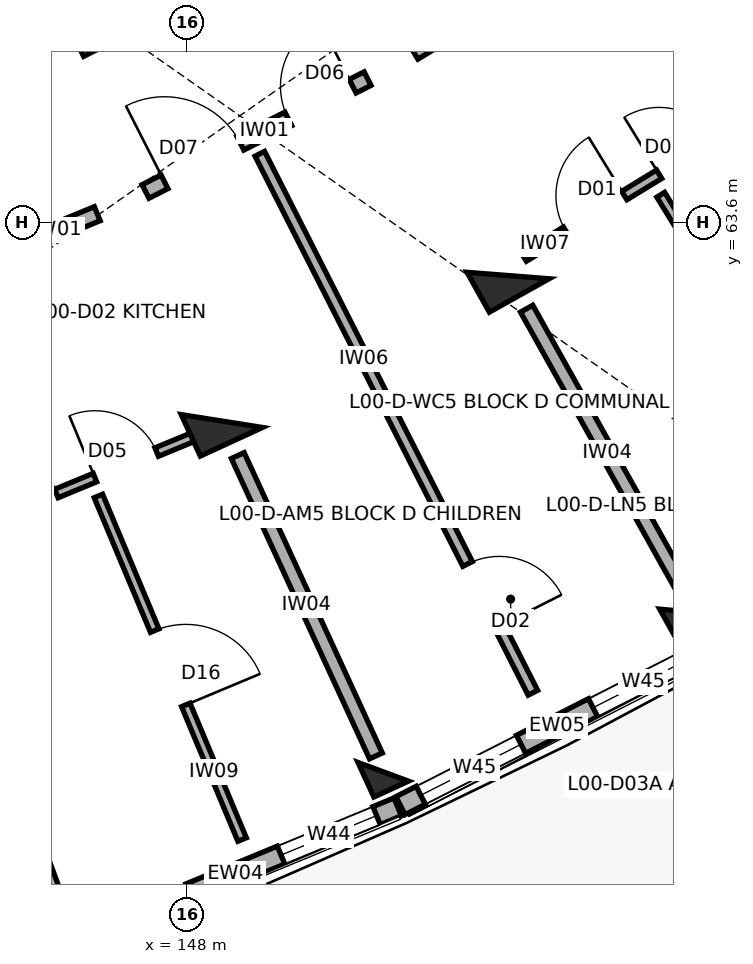
"""IFC4 building model, lengths in metres.
Left out: names, types, materials, properties, quantities, classifications, styles, units other than length and angle.
Written with IfcOpenShell. Run it as: python <this file> out.ifc"""

import sys

from ifc_helpers import new_model, si_unit, direction, frame, frame_2d, origin, origin_2d, place, context, subcontext, project, spatial, rectangle, extrude, element, fill, save


model = new_model("IFC4")
c1 = context("Model", 3, precision=1e-05, world=origin(), true_north=direction((0.0, 1.0)))
c2 = subcontext(c1, "Body", "Model", "MODEL_VIEW")
j1 = project(units=[si_unit("LENGTHUNIT", "METRE"), si_unit("PLANEANGLEUNIT", "RADIAN")], contexts=[c1])
p1 = place(None, origin())
s1 = spatial("IfcSite", under=j1, at=p1, CompositionType="ELEMENT")
p2 = place(p1, origin())
s2 = spatial("IfcBuilding", under=s1, at=p2, CompositionType="ELEMENT")
p3 = place(p2, origin())
s3 = spatial("IfcBuildingStorey", under=s2, at=p3, CompositionType="ELEMENT", Elevation=0.0)
p4 = place(p3, frame((146.311, 54.602, 0.0), z_axis=(0.0, 0.0, 1.0), x_axis=(0.345298198999, -0.93849302276, 0.0)))
e1 = element("IfcColumn", 1, at=p4, inside=s3, PredefinedType="COLUMN", context=c2, shape_type="SweptSolid", body=[
    extrude(rectangle(XDim=0.55, YDim=0.8, at=origin_2d()), origin(), (0.0, 0.0, 1.0), 4.5),
])
p5 = place(p3, frame((148.461, 60.982, 0.0), z_axis=(0.0, 0.0, 1.0), x_axis=(0.417867073801, -0.908508177527, 0.0)))
e2 = element("IfcColumn", 2, at=p5, inside=s3, PredefinedType="COLUMN", context=c2, shape_type="SweptSolid", body=[
    extrude(rectangle(XDim=0.6, YDim=0.9, at=origin_2d()), origin(), (0.0, 0.0, 1.0), 4.5),
])
p6 = place(p3, frame((150.584, 56.367, 0.0), z_axis=(0.0, 0.0, 1.0), x_axis=(0.417867073801, -0.908508177527, 0.0)))
e3 = element("IfcColumn", 3, at=p6, inside=s3, PredefinedType="COLUMN", context=c2, shape_type="SweptSolid", body=[
    extrude(rectangle(XDim=0.5, YDim=0.5, at=origin_2d()), origin(), (0.0, 0.0, 1.0), 4.5),
])
p7 = place(p3, frame((152.227, 62.897, 0.0), z_axis=(0.0, 0.0, 1.0), x_axis=(0.487859659139, -0.87292207727, 0.0)))
e4 = element("IfcColumn", 4, at=p7, inside=s3, PredefinedType="COLUMN", context=c2, shape_type="SweptSolid", body=[
    extrude(rectangle(XDim=0.6, YDim=0.9, at=origin_2d()), origin(), (0.0, 0.0, 1.0), 4.5),
])
p8 = place(p3, frame((154.705, 58.462, 0.0), z_axis=(0.0, 0.0, 1.0), x_axis=(0.487859659139, -0.87292207727, 0.0)))
e5 = element("IfcColumn", 5, at=p8, inside=s3, PredefinedType="COLUMN", context=c2, shape_type="SweptSolid", body=[
    extrude(rectangle(XDim=0.55, YDim=0.8, at=origin_2d()), origin(), (0.0, 0.0, 1.0), 4.5),
])
p9 = place(p3, frame((146.502, 54.14, 0.0), z_axis=(0.0, 0.0, 1.0), x_axis=(0.924221313894, 0.381857254669, 0.0)))
e6 = element("IfcWall", 6, at=p9, inside=s3, PredefinedType="SOLIDWALL", context=c2, shape_type="SweptSolid", body=[
    extrude(rectangle(XDim=4.623, YDim=0.255, at=frame_2d((2.311, 0.0))), origin(), (0.0, 0.0, 1.0), 3.45),
])
p10 = place(p9, frame((0.3, 0.0, 0.3)))
e7 = element("IfcOpeningElement", 7, at=p10, cuts=e6, PredefinedType="OPENING", context=c2, shape_type="SweptSolid", body=[
    extrude(rectangle(XDim=1.36, YDim=1.56, at=frame_2d((0.68, 0.78))), frame((0.0, 0.137, 0.0), z_axis=(0.0, -1.0, 0.0), x_axis=(1.0, 0.0, 0.0)), (0.0, 0.0, 1.0), 0.275),
])
p11 = place(p9, frame((2.962, 0.0, 0.3)))
e8 = element("IfcOpeningElement", 8, at=p11, cuts=e6, PredefinedType="OPENING", context=c2, shape_type="SweptSolid", body=[
    extrude(rectangle(XDim=1.36, YDim=1.56, at=frame_2d((0.68, 0.78))), frame((0.0, 0.137, 0.0), z_axis=(0.0, -1.0, 0.0), x_axis=(1.0, 0.0, 0.0)), (0.0, 0.0, 1.0), 0.275),
])
p12 = place(p3, frame((150.811, 55.922, 0.0), z_axis=(0.0, 0.0, 1.0), x_axis=(0.891407190547, 0.453203288428, 0.0)))
e9 = element("IfcWall", 9, at=p12, inside=s3, PredefinedType="SOLIDWALL", context=c2, shape_type="SweptSolid", body=[
    extrude(rectangle(XDim=4.623, YDim=0.265, at=frame_2d((2.311, 0.0))), origin(), (0.0, 0.0, 1.0), 3.45),
])
p13 = place(p12, frame((0.3, 0.0, 0.3)))
e10 = element("IfcOpeningElement", 10, at=p13, cuts=e9, PredefinedType="OPENING", context=c2, shape_type="SweptSolid", body=[
    extrude(rectangle(XDim=1.48, YDim=1.16, at=frame_2d((0.74, 0.58))), frame((0.0, 0.142, 0.0), z_axis=(0.0, -1.0, 0.0), x_axis=(1.0, 0.0, 0.0)), (0.0, 0.0, 1.0), 0.285),
])
p14 = place(p12, frame((2.843, 0.0, 0.3)))
e11 = element("IfcOpeningElement", 11, at=p14, cuts=e9, PredefinedType="OPENING", context=c2, shape_type="SweptSolid", body=[
    extrude(rectangle(XDim=1.48, YDim=1.16, at=frame_2d((0.74, 0.58))), frame((0.0, 0.142, 0.0), z_axis=(0.0, -1.0, 0.0), x_axis=(1.0, 0.0, 0.0)), (0.0, 0.0, 1.0), 0.285),
])
p15 = place(p3, frame((143.793, 62.459, 0.0), z_axis=(0.0, 0.0, 1.0), x_axis=(0.924214561665, 0.381873596896, 0.0)))
e12 = element("IfcWall", 12, at=p15, inside=s3, PredefinedType="SOLIDWALL", context=c2, shape_type="SweptSolid", body=[
    extrude(rectangle(XDim=3.277, YDim=0.2, at=frame_2d((1.639, 0.0))), origin(), (0.0, 0.0, 1.0), 3.34),
])
p16 = place(p15, frame((1.148, 0.0, 0.0)))
e13 = element("IfcOpeningElement", 13, at=p16, cuts=e12, PredefinedType="OPENING", context=c2, shape_type="SweptSolid", body=[
    extrude(rectangle(XDim=0.98, YDim=2.15, at=frame_2d((0.49, 1.075))), frame((0.0, 0.11, 0.0), z_axis=(0.0, -1.0, 0.0), x_axis=(1.0, 0.0, 0.0)), (0.0, 0.0, 1.0), 0.22),
])
p17 = place(p3, frame((144.852, 59.437, 0.0), z_axis=(0.0, 0.0, 1.0), x_axis=(0.924217547919, 0.381866369453, 0.0)))
e14 = element("IfcWall", 14, at=p17, inside=s3, PredefinedType="PARTITIONING", context=c2, shape_type="SweptSolid", body=[
    extrude(rectangle(XDim=3.628, YDim=0.12, at=frame_2d((1.814, 0.0))), origin(), (0.0, 0.0, 1.0), 3.34),
])
p18 = place(p17, frame((0.65, 0.0, 0.0)))
e15 = element("IfcOpeningElement", 15, at=p18, cuts=e14, PredefinedType="OPENING", context=c2, shape_type="SweptSolid", body=[
    extrude(rectangle(XDim=0.9, YDim=2.1, at=frame_2d((0.45, 1.05))), frame((0.0, 0.07, 0.0), z_axis=(0.0, -1.0, 0.0), x_axis=(1.0, 0.0, 0.0)), (0.0, 0.0, 1.0), 0.14),
])
p19 = place(p17, frame((2.098, 0.0, 0.0)))
e16 = element("IfcOpeningElement", 16, at=p19, cuts=e14, PredefinedType="OPENING", context=c2, shape_type="SweptSolid", body=[
    extrude(rectangle(XDim=0.88, YDim=2.1, at=frame_2d((0.44, 1.05))), frame((0.0, 0.07, 0.0), z_axis=(0.0, -1.0, 0.0), x_axis=(1.0, 0.0, 0.0)), (0.0, 0.0, 1.0), 0.14),
])
p20 = place(p3, frame((146.837, 59.996, 0.0), z_axis=(0.0, 0.0, 1.0), x_axis=(0.385846225752, -0.922563108992, 0.0)))
e17 = element("IfcWall", 17, at=p20, inside=s3, PredefinedType="PARTITIONING", context=c2, shape_type="SweptSolid", body=[
    extrude(rectangle(XDim=4.9, YDim=0.12, at=frame_2d((2.45, 0.0))), origin(), (0.0, 0.0, 1.0), 3.34),
])
p21 = place(p20, frame((1.92, 0.0, 0.0)))
e18 = element("IfcOpeningElement", 18, at=p21, cuts=e17, PredefinedType="OPENING", context=c2, shape_type="SweptSolid", body=[
    extrude(rectangle(XDim=1.06, YDim=2.1, at=frame_2d((0.53, 1.05))), frame((0.0, 0.07, 0.0), z_axis=(0.0, -1.0, 0.0), x_axis=(1.0, 0.0, 0.0)), (0.0, 0.0, 1.0), 0.14),
])
p22 = place(p3, frame((144.73, 58.9, 0.0), z_axis=(0.0, 0.0, 1.0), x_axis=(0.345273579683, -0.938502080537, 0.0)))
e19 = element("IfcWall", 19, at=p22, inside=s3, PredefinedType="SOLIDWALL", context=c2, shape_type="SweptSolid", body=[
    extrude(rectangle(XDim=4.35, YDim=0.185, at=frame_2d((2.175, 0.0))), origin(), (0.0, 0.0, 1.0), 3.34),
])
p23 = place(p3, frame((147.457, 64.003, 0.0), z_axis=(0.0, 0.0, 1.0), x_axis=(0.891412167565, 0.45319349898, 0.0)))
e20 = element("IfcWall", 20, at=p23, inside=s3, PredefinedType="SOLIDWALL", context=c2, shape_type="SweptSolid", body=[
    extrude(rectangle(XDim=3.277, YDim=0.2, at=frame_2d((1.639, 0.0))), origin(), (0.0, 0.0, 1.0), 3.34),
])
p24 = place(p23, frame((0.28, 0.0, 0.0)))
e21 = element("IfcOpeningElement", 21, at=p24, cuts=e20, PredefinedType="OPENING", context=c2, shape_type="SweptSolid", body=[
    extrude(rectangle(XDim=1.12, YDim=2.15, at=frame_2d((0.56, 1.075))), frame((0.0, 0.11, 0.0), z_axis=(0.0, -1.0, 0.0), x_axis=(1.0, 0.0, 0.0)), (0.0, 0.0, 1.0), 0.22),
])
p25 = place(p23, frame((2.107, 0.0, 0.0)))
e22 = element("IfcOpeningElement", 22, at=p25, cuts=e20, PredefinedType="OPENING", context=c2, shape_type="SweptSolid", body=[
    extrude(rectangle(XDim=0.95, YDim=2.1, at=frame_2d((0.475, 1.05))), frame((0.0, 0.11, 0.0), z_axis=(0.0, -1.0, 0.0), x_axis=(1.0, 0.0, 0.0)), (0.0, 0.0, 1.0), 0.22),
])
p26 = place(p3, frame((146.6, 65.865, 0.0), z_axis=(0.0, 0.0, 1.0), x_axis=(0.891414101388, 0.453189695212, 0.0)))
e23 = element("IfcWall", 23, at=p26, inside=s3, PredefinedType="SOLIDWALL", context=c2, shape_type="SweptSolid", body=[
    extrude(rectangle(XDim=3.116, YDim=0.19, at=frame_2d((1.558, 0.0))), origin(), (0.0, 0.0, 1.0), 3.34),
])
p27 = place(p26, frame((1.098, 0.0, 0.0)))
e24 = element("IfcOpeningElement", 24, at=p27, cuts=e23, PredefinedType="OPENING", context=c2, shape_type="SweptSolid", body=[
    extrude(rectangle(XDim=0.92, YDim=2.1, at=frame_2d((0.46, 1.05))), frame((0.0, 0.105, 0.0), z_axis=(0.0, -1.0, 0.0), x_axis=(1.0, 0.0, 0.0)), (0.0, 0.0, 1.0), 0.21),
])
p28 = place(p3, frame((148.96, 64.499, 0.0), z_axis=(0.0, 0.0, 1.0), x_axis=(0.451912010816, -0.892062517137, 0.0)))
e25 = element("IfcWall", 25, at=p28, inside=s3, PredefinedType="PARTITIONING", context=c2, shape_type="SweptSolid", body=[
    extrude(rectangle(XDim=7.95, YDim=0.14, at=frame_2d((3.975, 0.0))), origin(), (0.0, 0.0, 1.0), 3.34),
])
p29 = place(p28, frame((6.05, 0.0, 0.0)))
e26 = element("IfcOpeningElement", 26, at=p29, cuts=e25, PredefinedType="OPENING", context=c2, shape_type="SweptSolid", body=[
    extrude(rectangle(XDim=0.92, YDim=2.1, at=frame_2d((0.46, 1.05))), frame((0.0, 0.08, 0.0), z_axis=(0.0, -1.0, 0.0), x_axis=(1.0, 0.0, 0.0)), (0.0, 0.0, 1.0), 0.16),
])
p30 = place(p3, frame((148.67, 60.528, 0.0), z_axis=(0.0, 0.0, 1.0), x_axis=(0.417837051164, -0.908521985796, 0.0)))
e27 = element("IfcWall", 27, at=p30, inside=s3, PredefinedType="SOLIDWALL", context=c2, shape_type="SweptSolid", body=[
    extrude(rectangle(XDim=4.35, YDim=0.185, at=frame_2d((2.175, 0.0))), origin(), (0.0, 0.0, 1.0), 3.34),
])
p31 = place(p3, frame((150.989, 65.829, 0.0), z_axis=(0.0, 0.0, 1.0), x_axis=(0.853090237845, 0.521763400492, 0.0)))
e28 = element("IfcWall", 28, at=p31, inside=s3, PredefinedType="SOLIDWALL", context=c2, shape_type="SweptSolid", body=[
    extrude(rectangle(XDim=3.277, YDim=0.2, at=frame_2d((1.638, 0.0))), origin(), (0.0, 0.0, 1.0), 3.34),
])
p32 = place(p31, frame((1.148, 0.0, 0.0)))
e29 = element("IfcOpeningElement", 29, at=p32, cuts=e28, PredefinedType="OPENING", context=c2, shape_type="SweptSolid", body=[
    extrude(rectangle(XDim=0.98, YDim=2.15, at=frame_2d((0.49, 1.075))), frame((0.0, 0.11, 0.0), z_axis=(0.0, -1.0, 0.0), x_axis=(1.0, 0.0, 0.0)), (0.0, 0.0, 1.0), 0.22),
])
p33 = place(p3, frame((152.434, 63.141, 0.0), z_axis=(0.0, 0.0, 1.0), x_axis=(0.853089873067, 0.521763996909, 0.0)))
e30 = element("IfcWall", 30, at=p33, inside=s3, PredefinedType="PARTITIONING", context=c2, shape_type="SweptSolid", body=[
    extrude(rectangle(XDim=3.616, YDim=0.13, at=frame_2d((1.808, 0.0))), origin(), (0.0, 0.0, 1.0), 3.34),
])
p34 = place(p33, frame((0.65, 0.0, 0.0)))
e31 = element("IfcOpeningElement", 31, at=p34, cuts=e30, PredefinedType="OPENING", context=c2, shape_type="SweptSolid", body=[
    extrude(rectangle(XDim=0.9, YDim=2.1, at=frame_2d((0.45, 1.05))), frame((0.0, 0.075, 0.0), z_axis=(0.0, -1.0, 0.0), x_axis=(1.0, 0.0, 0.0)), (0.0, 0.0, 1.0), 0.15),
])
p35 = place(p33, frame((2.086, 0.0, 0.0)))
e32 = element("IfcOpeningElement", 32, at=p35, cuts=e30, PredefinedType="OPENING", context=c2, shape_type="SweptSolid", body=[
    extrude(rectangle(XDim=0.88, YDim=2.1, at=frame_2d((0.44, 1.05))), frame((0.0, 0.075, 0.0), z_axis=(0.0, -1.0, 0.0), x_axis=(1.0, 0.0, 0.0)), (0.0, 0.0, 1.0), 0.15),
])
p36 = place(p3, frame((154.235, 63.96, 0.0), z_axis=(0.0, 0.0, 1.0), x_axis=(0.524202618281, -0.851593573829, 0.0)))
e33 = element("IfcWall", 33, at=p36, inside=s3, PredefinedType="PARTITIONING", context=c2, shape_type="SweptSolid", body=[
    extrude(rectangle(XDim=5.05, YDim=0.12, at=frame_2d((2.525, 0.0))), origin(), (0.0, 0.0, 1.0), 3.34),
])
p37 = place(p36, frame((1.935, 0.0, 0.0)))
e34 = element("IfcOpeningElement", 34, at=p37, cuts=e33, PredefinedType="OPENING", context=c2, shape_type="SweptSolid", body=[
    extrude(rectangle(XDim=1.18, YDim=2.1, at=frame_2d((0.59, 1.05))), frame((0.0, 0.07, 0.0), z_axis=(0.0, -1.0, 0.0), x_axis=(1.0, 0.0, 0.0)), (0.0, 0.0, 1.0), 0.14),
])
p38 = place(p3, frame((152.471, 62.46, 0.0), z_axis=(0.0, 0.0, 1.0), x_axis=(0.487866639184, -0.872918176218, 0.0)))
e35 = element("IfcWall", 35, at=p38, inside=s3, PredefinedType="SOLIDWALL", context=c2, shape_type="SweptSolid", body=[
    extrude(rectangle(XDim=4.35, YDim=0.185, at=frame_2d((2.175, 0.0))), origin(), (0.0, 0.0, 1.0), 3.34),
])
p39 = place(p11, origin())
e36 = element("IfcWindow", 36, at=p39, inside=s3, PartitioningType="DOUBLE_PANEL_VERTICAL", PredefinedType="WINDOW", context=c2, shape_type="SweptSolid", body=[
    extrude(rectangle(XDim=1.36, YDim=1.56, at=frame_2d((0.68, 0.78))), frame((0.0, 0.03, 0.0), z_axis=(0.0, -1.0, 0.0), x_axis=(1.0, 0.0, 0.0)), (0.0, 0.0, 1.0), 0.06),
])
fill(e8, e36)
p40 = place(p13, origin())
e37 = element("IfcWindow", 37, at=p40, inside=s3, PartitioningType="DOUBLE_PANEL_VERTICAL", PredefinedType="WINDOW", context=c2, shape_type="SweptSolid", body=[
    extrude(rectangle(XDim=1.48, YDim=1.16, at=frame_2d((0.74, 0.58))), frame((0.0, 0.03, 0.0), z_axis=(0.0, -1.0, 0.0), x_axis=(1.0, 0.0, 0.0)), (0.0, 0.0, 1.0), 0.06),
])
fill(e10, e37)
p41 = place(p14, origin())
e38 = element("IfcWindow", 38, at=p41, inside=s3, PartitioningType="DOUBLE_PANEL_VERTICAL", PredefinedType="WINDOW", context=c2, shape_type="SweptSolid", body=[
    extrude(rectangle(XDim=1.48, YDim=1.16, at=frame_2d((0.74, 0.58))), frame((0.0, 0.03, 0.0), z_axis=(0.0, -1.0, 0.0), x_axis=(1.0, 0.0, 0.0)), (0.0, 0.0, 1.0), 0.06),
])
fill(e11, e38)
p42 = place(p18, origin())
e39 = element("IfcDoor", 39, at=p42, inside=s3, OperationType="SINGLE_SWING_RIGHT", PredefinedType="DOOR", context=c2, shape_type="SweptSolid", body=[
    extrude(rectangle(XDim=0.9, YDim=2.1, at=frame_2d((0.45, 1.05))), frame((0.0, 0.025, 0.0), z_axis=(0.0, -1.0, 0.0), x_axis=(1.0, 0.0, 0.0)), (0.0, 0.0, 1.0), 0.05),
])
fill(e15, e39)
p43 = place(p19, origin())
e40 = element("IfcDoor", 40, at=p43, inside=s3, OperationType="SINGLE_SWING_LEFT", PredefinedType="DOOR", context=c2, shape_type="SweptSolid", body=[
    extrude(rectangle(XDim=0.88, YDim=2.1, at=frame_2d((0.44, 1.05))), frame((0.0, 0.025, 0.0), z_axis=(0.0, -1.0, 0.0), x_axis=(1.0, 0.0, 0.0)), (0.0, 0.0, 1.0), 0.05),
])
fill(e16, e40)
p44 = place(p21, origin())
e41 = element("IfcDoor", 41, at=p44, inside=s3, OperationType="SINGLE_SWING_RIGHT", PredefinedType="DOOR", context=c2, shape_type="SweptSolid", body=[
    extrude(rectangle(XDim=1.06, YDim=2.1, at=frame_2d((0.53, 1.05))), frame((0.0, 0.025, 0.0), z_axis=(0.0, -1.0, 0.0), x_axis=(1.0, 0.0, 0.0)), (0.0, 0.0, 1.0), 0.05),
])
fill(e18, e41)
p45 = place(p24, origin())
e42 = element("IfcDoor", 42, at=p45, inside=s3, OperationType="SINGLE_SWING_LEFT", PredefinedType="DOOR", context=c2, shape_type="SweptSolid", body=[
    extrude(rectangle(XDim=1.12, YDim=2.15, at=frame_2d((0.56, 1.075))), frame((0.0, 0.025, 0.0), z_axis=(0.0, -1.0, 0.0), x_axis=(1.0, 0.0, 0.0)), (0.0, 0.0, 1.0), 0.05),
])
fill(e21, e42)
p46 = place(p25, origin())
e43 = element("IfcDoor", 43, at=p46, inside=s3, OperationType="SINGLE_SWING_RIGHT", PredefinedType="DOOR", context=c2, shape_type="SweptSolid", body=[
    extrude(rectangle(XDim=0.95, YDim=2.1, at=frame_2d((0.475, 1.05))), frame((0.0, 0.025, 0.0), z_axis=(0.0, -1.0, 0.0), x_axis=(1.0, 0.0, 0.0)), (0.0, 0.0, 1.0), 0.05),
])
fill(e22, e43)
p47 = place(p29, origin())
e44 = element("IfcDoor", 44, at=p47, inside=s3, OperationType="SINGLE_SWING_RIGHT", PredefinedType="DOOR", context=c2, shape_type="SweptSolid", body=[
    extrude(rectangle(XDim=0.92, YDim=2.1, at=frame_2d((0.46, 1.05))), frame((0.0, 0.025, 0.0), z_axis=(0.0, -1.0, 0.0), x_axis=(1.0, 0.0, 0.0)), (0.0, 0.0, 1.0), 0.05),
])
fill(e26, e44)
p48 = place(p34, origin())
e45 = element("IfcDoor", 45, at=p48, inside=s3, OperationType="SINGLE_SWING_RIGHT", PredefinedType="DOOR", context=c2, shape_type="SweptSolid", body=[
    extrude(rectangle(XDim=0.9, YDim=2.1, at=frame_2d((0.45, 1.05))), frame((0.0, 0.025, 0.0), z_axis=(0.0, -1.0, 0.0), x_axis=(1.0, 0.0, 0.0)), (0.0, 0.0, 1.0), 0.05),
])
fill(e31, e45)
p49 = place(p35, origin())
e46 = element("IfcDoor", 46, at=p49, inside=s3, OperationType="SINGLE_SWING_LEFT", PredefinedType="DOOR", context=c2, shape_type="SweptSolid", body=[
    extrude(rectangle(XDim=0.88, YDim=2.1, at=frame_2d((0.44, 1.05))), frame((0.0, 0.025, 0.0), z_axis=(0.0, -1.0, 0.0), x_axis=(1.0, 0.0, 0.0)), (0.0, 0.0, 1.0), 0.05),
])
fill(e32, e46)
save(model, sys.argv[1])
